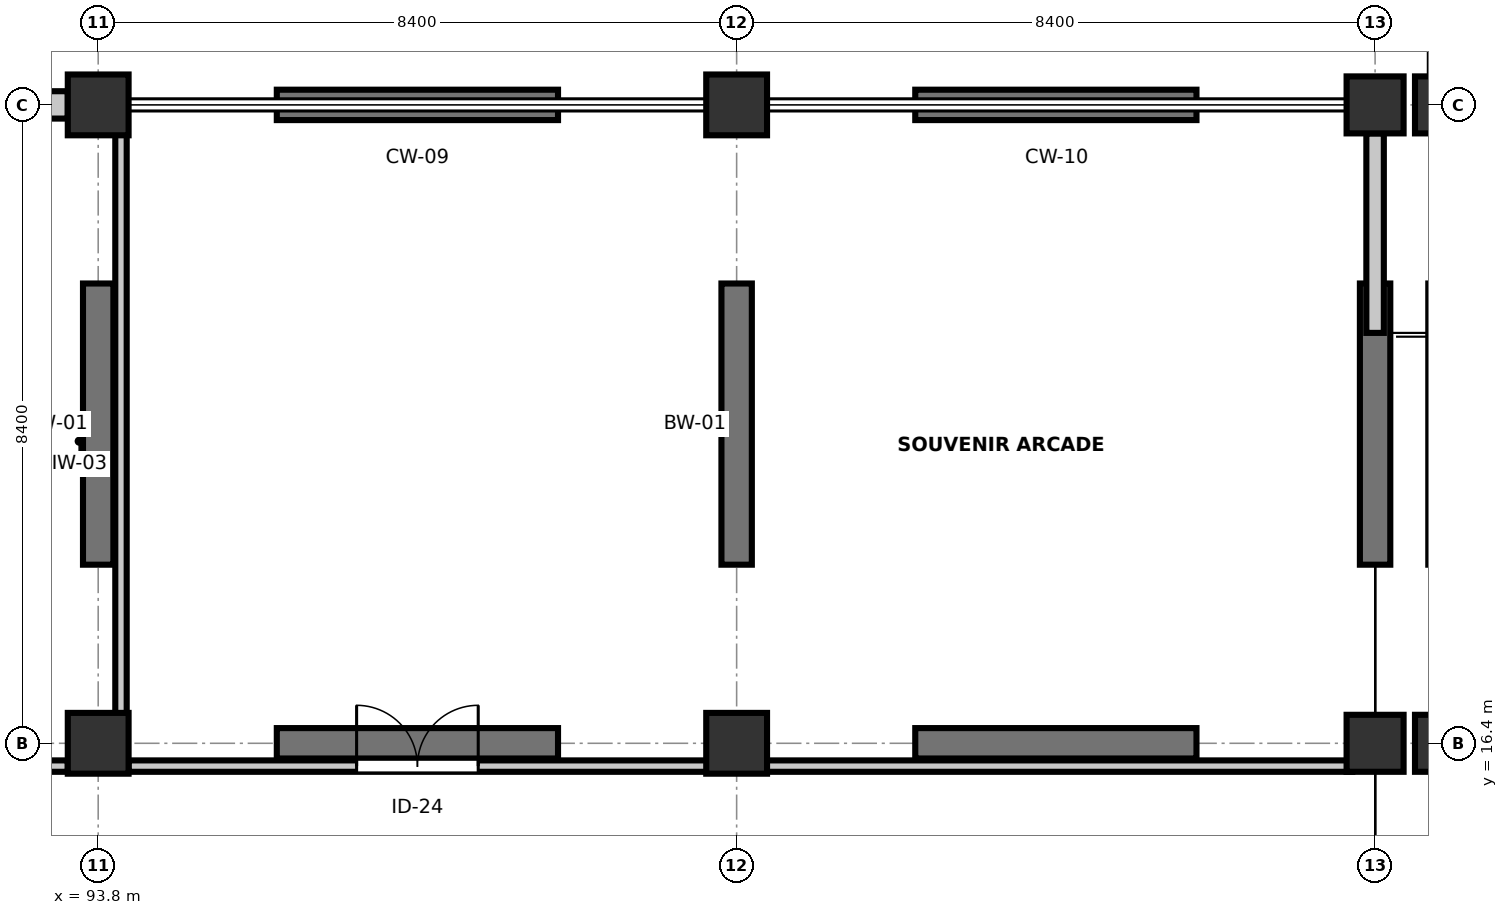
"""IFC4 building model, lengths in metres.
Left out: names, types, materials, properties, quantities, classifications, styles, units other than length and angle.
Written with IfcOpenShell. Run it as: python <this file> out.ifc"""

import sys

from ifc_helpers import new_model, si_unit, direction, frame, frame_2d, origin, origin_2d, place, context, subcontext, project, spatial, rectangle, extrude, element, fill, save


model = new_model("IFC4")
c1 = context("Model", 3, precision=1e-05, world=origin(), true_north=direction((0.0, 1.0)))
c2 = subcontext(c1, "Body", "Model", "MODEL_VIEW")
j1 = project(units=[si_unit("LENGTHUNIT", "METRE"), si_unit("PLANEANGLEUNIT", "RADIAN")], contexts=[c1])
p1 = place(None, origin())
s1 = spatial("IfcSite", under=j1, at=p1, CompositionType="ELEMENT")
p2 = place(p1, origin())
s2 = spatial("IfcBuilding", under=s1, at=p2, CompositionType="ELEMENT")
p3 = place(p2, frame((0.0, 0.0, 4.8)))
s3 = spatial("IfcBuildingStorey", under=s2, at=p3, CompositionType="ELEMENT", Elevation=4.8)
for number, where, z_axis, x_axis in (
    (1, (93.8, 16.4, 0.0), (0.0, 0.0, 1.0), (1.0, 0.0, 0.0)),
    (2, (93.8, 24.8, 0.0), (0.0, 0.0, 1.0), (1.0, 0.0, 0.0)),
    (3, (102.2, 16.4, 0.0), (0.0, 0.0, 1.0), (1.0, 0.0, 0.0)),
    (4, (102.2, 24.8, 0.0), (0.0, 0.0, 1.0), (1.0, 0.0, 0.0)),
):
    element("IfcColumn", number, at=place(p3, frame(where, z_axis=z_axis, x_axis=x_axis)), inside=s3, PredefinedType="COLUMN", context=c2, shape_type="SweptSolid", body=[
        extrude(rectangle(XDim=0.8, YDim=0.8, at=origin_2d()), origin(), (0.0, 0.0, 1.0), 4.8),
    ])
for number, where, z_axis, x_axis in (
    (5, (110.6, 16.4, 0.0), (0.0, 0.0, 1.0), (1.0, 0.0, 0.0)),
    (6, (110.6, 24.8, 0.0), (0.0, 0.0, 1.0), (1.0, 0.0, 0.0)),
):
    element("IfcColumn", number, at=place(p3, frame(where, z_axis=z_axis, x_axis=x_axis)), inside=s3, PredefinedType="COLUMN", context=c2, shape_type="SweptSolid", body=[
        extrude(rectangle(XDim=0.75, YDim=0.75, at=origin_2d()), origin(), (0.0, 0.0, 1.0), 4.8),
    ])
p4 = place(p3, frame((96.15, 16.4, -2.1), z_axis=(0.0, 0.0, 1.0), x_axis=(1.0, 0.0, 0.0)))
e7 = element("IfcWall", 7, at=p4, inside=s3, PredefinedType="SOLIDWALL", context=c2, shape_type="SweptSolid", body=[
    extrude(rectangle(XDim=3.7, YDim=0.4, at=frame_2d((1.85, 0.0))), origin(), (0.0, 0.0, 1.0), 1.85),
])
p5 = place(p3, frame((104.55, 16.4, -2.1), z_axis=(0.0, 0.0, 1.0), x_axis=(1.0, 0.0, 0.0)))
e8 = element("IfcWall", 8, at=p5, inside=s3, PredefinedType="SOLIDWALL", context=c2, shape_type="SweptSolid", body=[
    extrude(rectangle(XDim=3.7, YDim=0.4, at=frame_2d((1.85, 0.0))), origin(), (0.0, 0.0, 1.0), 1.85),
])
p6 = place(p3, frame((96.15, 24.8, -2.1), z_axis=(0.0, 0.0, 1.0), x_axis=(1.0, 0.0, 0.0)))
e9 = element("IfcWall", 9, at=p6, inside=s3, PredefinedType="SOLIDWALL", context=c2, shape_type="SweptSolid", body=[
    extrude(rectangle(XDim=3.7, YDim=0.4, at=frame_2d((1.85, 0.0))), origin(), (0.0, 0.0, 1.0), 1.85),
])
for number, where, z_axis, x_axis in (
    (10, (104.55, 24.8, -2.1), (0.0, 0.0, 1.0), (1.0, 0.0, 0.0)),
    (11, (93.8, 18.75, -2.1), (0.0, 0.0, 1.0), (0.0, 1.0, 0.0)),
    (12, (102.2, 18.75, -2.1), (0.0, 0.0, 1.0), (0.0, 1.0, 0.0)),
    (13, (110.6, 18.75, -2.1), (0.0, 0.0, 1.0), (0.0, 1.0, 0.0)),
):
    element("IfcWall", number, at=place(p3, frame(where, z_axis=z_axis, x_axis=x_axis)), inside=s3, PredefinedType="SOLIDWALL", context=c2, shape_type="SweptSolid", body=[
        extrude(rectangle(XDim=3.7, YDim=0.4, at=frame_2d((1.85, 0.0))), origin(), (0.0, 0.0, 1.0), 1.85),
    ])
for number, where, z_axis, x_axis in (
    (14, (111.5, 16.4, 0.0), (0.0, 0.0, 1.0), (1.0, 0.0, 0.0)),
    (15, (111.5, 24.8, 0.0), (0.0, 0.0, 1.0), (1.0, 0.0, 0.0)),
):
    element("IfcColumn", number, at=place(p3, frame(where, z_axis=z_axis, x_axis=x_axis)), inside=s3, PredefinedType="COLUMN", context=c2, shape_type="SweptSolid", body=[
        extrude(rectangle(XDim=0.75, YDim=0.75, at=origin_2d()), origin(), (0.0, 0.0, 1.0), 4.8),
    ])
p7 = place(p3, frame((110.6, 21.8, 0.0), z_axis=(0.0, 0.0, 1.0), x_axis=(0.0, 1.0, 0.0)))
e16 = element("IfcWall", 16, at=p7, inside=s3, PredefinedType="STANDARD", context=c2, shape_type="SweptSolid", body=[
    extrude(rectangle(XDim=2.625, YDim=0.23, at=frame_2d((1.312, 0.0))), origin(), (0.0, 0.0, 1.0), 3.785),
])
p8 = place(p3, frame((93.4, 24.8, 0.0), z_axis=(0.0, 0.0, 1.0), x_axis=(-1.0, 0.0, 0.0)))
e17 = element("IfcWall", 17, at=p8, inside=s3, PredefinedType="STANDARD", context=c2, shape_type="SweptSolid", body=[
    extrude(rectangle(XDim=7.6, YDim=0.36, at=frame_2d((3.8, 0.0))), origin(), (0.0, 0.0, 1.0), 3.785),
])
p9 = place(p8, frame((2.85, 0.0, 0.0)))
e18 = element("IfcOpeningElement", 18, at=p9, cuts=e17, PredefinedType="OPENING", context=c2, shape_type="SweptSolid", body=[
    extrude(rectangle(XDim=1.9, YDim=2.3, at=frame_2d((0.95, 1.15))), frame((0.0, 0.19, 0.0), z_axis=(0.0, -1.0, 0.0), x_axis=(1.0, 0.0, 0.0)), (0.0, 0.0, 1.0), 0.38),
])
p10 = place(p3, frame((77.3, 16.1, 0.0), z_axis=(0.0, 0.0, 1.0), x_axis=(1.0, 0.0, 0.0)))
e19 = element("IfcWall", 19, at=p10, inside=s3, PredefinedType="PARTITIONING", context=c2, shape_type="SweptSolid", body=[
    extrude(rectangle(XDim=16.1, YDim=0.15, at=frame_2d((8.05, 0.0))), origin(), (0.0, 0.0, 1.0), 3.685),
])
p11 = place(p10, frame((3.1, 0.0, 0.0)))
e20 = element("IfcOpeningElement", 20, at=p11, cuts=e19, PredefinedType="OPENING", context=c2, shape_type="SweptSolid", body=[
    extrude(rectangle(XDim=1.6, YDim=2.28, at=frame_2d((0.8, 1.14))), frame((0.0, 0.085, 0.0), z_axis=(0.0, -1.0, 0.0), x_axis=(1.0, 0.0, 0.0)), (0.0, 0.0, 1.0), 0.17),
])
p12 = place(p3, frame((94.2, 16.1, 0.0), z_axis=(0.0, 0.0, 1.0), x_axis=(1.0, 0.0, 0.0)))
e21 = element("IfcWall", 21, at=p12, inside=s3, PredefinedType="PARTITIONING", context=c2, shape_type="SweptSolid", body=[
    extrude(rectangle(XDim=16.1, YDim=0.15, at=frame_2d((8.05, 0.0))), origin(), (0.0, 0.0, 1.0), 3.685),
])
p13 = place(p12, frame((3.0, 0.0, 0.0)))
e22 = element("IfcOpeningElement", 22, at=p13, cuts=e21, PredefinedType="OPENING", context=c2, shape_type="SweptSolid", body=[
    extrude(rectangle(XDim=1.6, YDim=2.28, at=frame_2d((0.8, 1.14))), frame((0.0, 0.085, 0.0), z_axis=(0.0, -1.0, 0.0), x_axis=(1.0, 0.0, 0.0)), (0.0, 0.0, 1.0), 0.17),
])
p14 = place(p3, frame((94.1, 16.25, 0.0), z_axis=(0.0, 0.0, 1.0), x_axis=(0.0, 1.0, 0.0)))
e23 = element("IfcWall", 23, at=p14, inside=s3, PredefinedType="PARTITIONING", context=c2, shape_type="SweptSolid", body=[
    extrude(rectangle(XDim=8.25, YDim=0.15, at=frame_2d((4.125, 0.0))), origin(), (0.0, 0.0, 1.0), 4.135),
])
p15 = place(p13, origin())
e24 = element("IfcDoor", 24, at=p15, inside=s3, OperationType="DOUBLE_DOOR_SINGLE_SWING", PredefinedType="DOOR", context=c2, shape_type="SweptSolid", body=[
    extrude(rectangle(XDim=1.6, YDim=2.28, at=frame_2d((0.8, 1.14))), frame((0.0, 0.025, 0.0), z_axis=(0.0, -1.0, 0.0), x_axis=(1.0, 0.0, 0.0)), (0.0, 0.0, 1.0), 0.05),
])
fill(e22, e24)
save(model, sys.argv[1])
